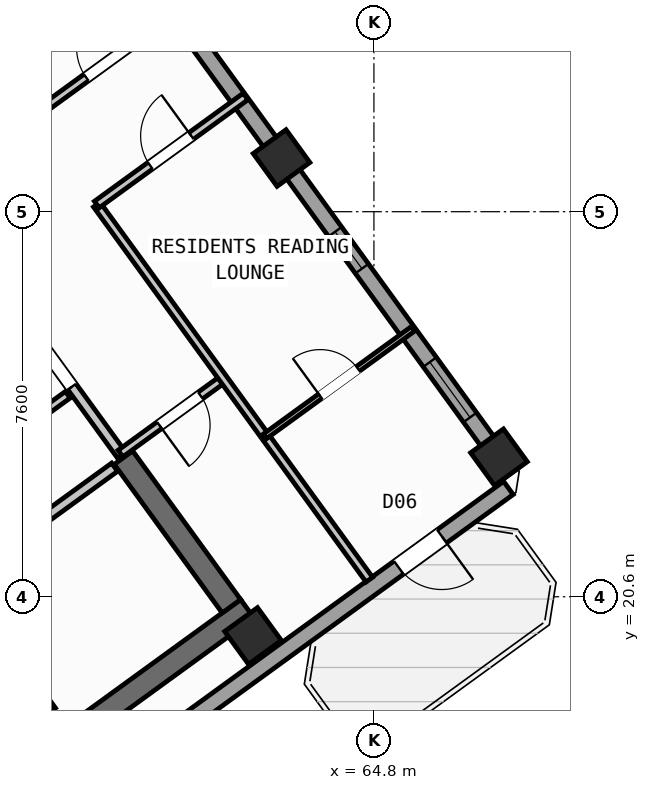
"""IFC4 building model, lengths in metres.
Left out: names, types, materials, properties, quantities, classifications, styles, units other than length and angle.
Written with IfcOpenShell. Run it as: python <this file> out.ifc"""

import sys

from ifc_helpers import new_model, si_unit, direction, frame, frame_2d, origin, origin_2d, place, context, subcontext, project, spatial, rectangle, hollow_rectangle, extrude, source, transform, mapped, element, fill, save


model = new_model("IFC4")
c1 = context("Model", 3, precision=1e-05, world=origin(), true_north=direction((0.0, 1.0)))
c2 = subcontext(c1, "Body", "Model", "MODEL_VIEW")
j1 = project(units=[si_unit("LENGTHUNIT", "METRE"), si_unit("PLANEANGLEUNIT", "RADIAN")], contexts=[c1])
p1 = place(None, origin())
s1 = spatial("IfcSite", under=j1, at=p1, CompositionType="ELEMENT")
p2 = place(p1, origin())
s2 = spatial("IfcBuilding", under=s1, at=p2, CompositionType="ELEMENT")
p3 = place(p2, frame((0.0, 0.0, 211.2)))
s3 = spatial("IfcBuildingStorey", under=s2, at=p3, CompositionType="ELEMENT", Elevation=211.2)
p4 = place(p3, frame((52.399, 13.169, 0.0), z_axis=(0.0, 0.0, 1.0), x_axis=(0.809022352778, 0.587777877013, 0.0)))
e1 = element("IfcWall", 1, at=p4, inside=s3, PredefinedType="SHEAR", context=c2, shape_type="SweptSolid", body=[
    extrude(rectangle(XDim=12.24, YDim=0.45, at=frame_2d((6.12, 0.0))), origin(), (0.0, 0.0, 1.0), 3.35),
])
p5 = place(p3, frame((61.988, 20.413, 0.0), z_axis=(0.0, 0.0, 1.0), x_axis=(-0.587819244441, 0.808992296542, 0.0)))
e2 = element("IfcWall", 2, at=p5, inside=s3, PredefinedType="SHEAR", context=c2, shape_type="SweptSolid", body=[
    extrude(rectangle(XDim=3.625, YDim=0.45, at=frame_2d((1.812, 0.0))), origin(), (0.0, 0.0, 1.0), 3.35),
])
m1 = source(origin(), c2, "Body", "SweptSolid", [
    extrude(hollow_rectangle(XDim=0.8, YDim=0.8, WallThickness=0.032, at=origin_2d()), origin(), (0.0, 0.0, 1.0), 3.6),
])
for number, where, z_axis, x_axis in (
    (3, (62.414, 19.827, 0.0), (0.0, 0.0, 1.0), (0.809, 0.588, 0.0)),
    (4, (67.268, 23.354, 0.0), (0.0, 0.0, 1.0), (0.809, 0.588, 0.0)),
    (5, (62.977, 29.259, 0.0), (0.0, 0.0, 1.0), (0.809, 0.588, 0.0)),
):
    element("IfcColumn", number, at=place(p3, frame(where, z_axis=z_axis, x_axis=x_axis)), inside=s3, PredefinedType="COLUMN", context=c2, shape_type="MappedRepresentation", body=[
        mapped(m1, transform((0.0, 0.0, 0.0), scale=1.0)),
    ])
p6 = place(p3, frame((54.81, 40.5, 0.0), z_axis=(0.0, 0.0, 1.0), x_axis=(0.587783625747, -0.809018176127, 0.0)))
e6 = element("IfcWall", 6, at=p6, inside=s3, PredefinedType="STANDARD", context=c2, shape_type="SweptSolid", body=[
    extrude(rectangle(XDim=21.587, YDim=0.32, at=frame_2d((10.794, 0.0))), origin(), (0.0, 0.0, 1.0), 2.825),
])
p7 = place(p6, frame((1.403, 0.0, 0.9)))
e7 = element("IfcOpeningElement", 7, at=p7, cuts=e6, PredefinedType="OPENING", context=c2, shape_type="SweptSolid", body=[
    extrude(rectangle(XDim=1.65, YDim=1.45, at=frame_2d((0.825, 0.725))), frame((0.0, 0.17, 0.0), z_axis=(0.0, -1.0, 0.0), x_axis=(1.0, 0.0, 0.0)), (0.0, 0.0, 1.0), 0.34),
])
p8 = place(p6, frame((4.695, 0.0, 1.0)))
e8 = element("IfcOpeningElement", 8, at=p8, cuts=e6, PredefinedType="OPENING", context=c2, shape_type="SweptSolid", body=[
    extrude(rectangle(XDim=0.9, YDim=1.25, at=frame_2d((0.45, 0.625))), frame((0.0, 0.17, 0.0), z_axis=(0.0, -1.0, 0.0), x_axis=(1.0, 0.0, 0.0)), (0.0, 0.0, 1.0), 0.34),
])
p9 = place(p6, frame((7.604, 0.0, 0.95)))
e9 = element("IfcOpeningElement", 9, at=p9, cuts=e6, PredefinedType="OPENING", context=c2, shape_type="SweptSolid", body=[
    extrude(rectangle(XDim=1.95, YDim=1.35, at=frame_2d((0.975, 0.675))), frame((0.0, 0.17, 0.0), z_axis=(0.0, -1.0, 0.0), x_axis=(1.0, 0.0, 0.0)), (0.0, 0.0, 1.0), 0.34),
])
p10 = place(p6, frame((15.692, 0.0, 1.0)))
e10 = element("IfcOpeningElement", 10, at=p10, cuts=e6, PredefinedType="OPENING", context=c2, shape_type="SweptSolid", body=[
    extrude(rectangle(XDim=0.9, YDim=1.25, at=frame_2d((0.45, 0.625))), frame((0.0, 0.17, 0.0), z_axis=(0.0, -1.0, 0.0), x_axis=(1.0, 0.0, 0.0)), (0.0, 0.0, 1.0), 0.34),
])
p11 = place(p6, frame((18.872, 0.0, 0.9)))
e11 = element("IfcOpeningElement", 11, at=p11, cuts=e6, PredefinedType="OPENING", context=c2, shape_type="SweptSolid", body=[
    extrude(rectangle(XDim=1.35, YDim=1.45, at=frame_2d((0.675, 0.725))), frame((0.0, 0.17, 0.0), z_axis=(0.0, -1.0, 0.0), x_axis=(1.0, 0.0, 0.0)), (0.0, 0.0, 1.0), 0.34),
])
p12 = place(p3, frame((67.454, 22.747, 0.0), z_axis=(0.0, 0.0, 1.0), x_axis=(-0.809021120468, -0.587779573171, 0.0)))
e12 = element("IfcWall", 12, at=p12, inside=s3, PredefinedType="STANDARD", context=c2, shape_type="SweptSolid", body=[
    extrude(rectangle(XDim=17.588, YDim=0.32, at=frame_2d((8.794, 0.0))), origin(), (0.0, 0.0, 1.0), 3.35),
])
p13 = place(p12, frame((1.624, 0.0, 0.0)))
e13 = element("IfcOpeningElement", 13, at=p13, cuts=e12, PredefinedType="OPENING", context=c2, shape_type="SweptSolid", body=[
    extrude(rectangle(XDim=1.05, YDim=2.15, at=frame_2d((0.525, 1.075))), frame((0.0, 0.17, 0.0), z_axis=(0.0, -1.0, 0.0), x_axis=(1.0, 0.0, 0.0)), (0.0, 0.0, 1.0), 0.34),
])
p14 = place(p12, frame((8.344, 0.0, 0.9)))
e14 = element("IfcOpeningElement", 14, at=p14, cuts=e12, PredefinedType="OPENING", context=c2, shape_type="SweptSolid", body=[
    extrude(rectangle(XDim=1.65, YDim=1.45, at=frame_2d((0.825, 0.725))), frame((0.0, 0.17, 0.0), z_axis=(0.0, -1.0, 0.0), x_axis=(1.0, 0.0, 0.0)), (0.0, 0.0, 1.0), 0.34),
])
p15 = place(p12, frame((13.594, 0.0, 0.9)))
e15 = element("IfcOpeningElement", 15, at=p15, cuts=e12, PredefinedType="OPENING", context=c2, shape_type="SweptSolid", body=[
    extrude(rectangle(XDim=1.65, YDim=1.45, at=frame_2d((0.825, 0.725))), frame((0.0, 0.17, 0.0), z_axis=(0.0, -1.0, 0.0), x_axis=(1.0, 0.0, 0.0)), (0.0, 0.0, 1.0), 0.34),
])
p16 = place(p3, frame((52.472, 14.013, 0.0), z_axis=(0.0, 0.0, 1.0), x_axis=(0.809028366311, 0.587769599847, 0.0)))
e16 = element("IfcWall", 16, at=p16, inside=s3, PredefinedType="SHEAR", context=c2, shape_type="SweptSolid", body=[
    extrude(rectangle(XDim=7.33, YDim=0.26, at=frame_2d((3.665, 0.0))), origin(), (0.0, 0.0, 1.0), 3.35),
])
p17 = place(p3, frame((58.41, 18.327, 0.0), z_axis=(0.0, 0.0, 1.0), x_axis=(-0.58776738483, 0.809029975545, 0.0)))
e17 = element("IfcWall", 17, at=p17, inside=s3, PredefinedType="SHEAR", context=c2, shape_type="SweptSolid", body=[
    extrude(rectangle(XDim=3.16, YDim=0.26, at=frame_2d((1.58, 0.0))), origin(), (0.0, 0.0, 1.0), 3.35),
])
p18 = place(p3, frame((56.553, 20.884, 0.0), z_axis=(0.0, 0.0, 1.0), x_axis=(0.809041669066, 0.587751288995, 0.0)))
e18 = element("IfcWall", 18, at=p18, inside=s3, PredefinedType="STANDARD", context=c2, shape_type="SweptSolid", body=[
    extrude(rectangle(XDim=3.868, YDim=0.2, at=frame_2d((1.934, 0.0))), origin(), (0.0, 0.0, 1.0), 3.34),
])
p19 = place(p18, frame((0.55, 0.0, 0.0)))
e19 = element("IfcOpeningElement", 19, at=p19, cuts=e18, PredefinedType="OPENING", context=c2, shape_type="SweptSolid", body=[
    extrude(rectangle(XDim=0.86, YDim=2.05, at=frame_2d((0.43, 1.025))), frame((0.0, 0.11, 0.0), z_axis=(0.0, -1.0, 0.0), x_axis=(1.0, 0.0, 0.0)), (0.0, 0.0, 1.0), 0.22),
])
p20 = place(p3, frame((54.421, 21.436, 0.0), z_axis=(0.0, 0.0, 1.0), x_axis=(0.809013710463, 0.587789772183, 0.0)))
e20 = element("IfcWall", 20, at=p20, inside=s3, PredefinedType="PARTITIONING", context=c2, shape_type="SweptSolid", body=[
    extrude(rectangle(XDim=5.36, YDim=0.16, at=frame_2d((2.68, 0.0))), origin(), (0.0, 0.0, 1.0), 3.34),
])
p21 = place(p20, frame((1.4, 0.0, 0.0)))
e21 = element("IfcOpeningElement", 21, at=p21, cuts=e20, PredefinedType="OPENING", context=c2, shape_type="SweptSolid", body=[
    extrude(rectangle(XDim=0.86, YDim=2.05, at=frame_2d((0.43, 1.025))), frame((0.0, 0.09, 0.0), z_axis=(0.0, -1.0, 0.0), x_axis=(1.0, 0.0, 0.0)), (0.0, 0.0, 1.0), 0.18),
])
p22 = place(p3, frame((59.827, 23.386, 0.0), z_axis=(0.0, 0.0, 1.0), x_axis=(-0.587803840107, 0.809003489211, 0.0)))
e22 = element("IfcWall", 22, at=p22, inside=s3, PredefinedType="STANDARD", context=c2, shape_type="SweptSolid", body=[
    extrude(rectangle(XDim=2.96, YDim=0.2, at=frame_2d((1.48, 0.0))), origin(), (0.0, 0.0, 1.0), 3.34),
])
p23 = place(p22, frame((1.68, 0.0, 0.0)))
e23 = element("IfcOpeningElement", 23, at=p23, cuts=e22, PredefinedType="OPENING", context=c2, shape_type="SweptSolid", body=[
    extrude(rectangle(XDim=1.0, YDim=2.1, at=frame_2d((0.5, 1.05))), frame((0.0, 0.11, 0.0), z_axis=(0.0, -1.0, 0.0), x_axis=(1.0, 0.0, 0.0)), (0.0, 0.0, 1.0), 0.22),
])
p24 = place(p3, frame((59.798, 23.427, 0.0), z_axis=(0.0, 0.0, 1.0), x_axis=(0.809034604122, 0.587761013791, 0.0)))
e24 = element("IfcWall", 24, at=p24, inside=s3, PredefinedType="PARTITIONING", context=c2, shape_type="SweptSolid", body=[
    extrude(rectangle(XDim=2.51, YDim=0.16, at=frame_2d((1.255, 0.0))), origin(), (0.0, 0.0, 1.0), 3.34),
])
p25 = place(p24, frame((0.95, 0.0, 0.0)))
e25 = element("IfcOpeningElement", 25, at=p25, cuts=e24, PredefinedType="OPENING", context=c2, shape_type="SweptSolid", body=[
    extrude(rectangle(XDim=1.0, YDim=2.1, at=frame_2d((0.5, 1.05))), frame((0.0, 0.09, 0.0), z_axis=(0.0, -1.0, 0.0), x_axis=(1.0, 0.0, 0.0)), (0.0, 0.0, 1.0), 0.18),
])
p26 = place(p3, frame((64.709, 20.938, 0.0), z_axis=(0.0, 0.0, 1.0), x_axis=(-0.587776590479, 0.80902328748, 0.0)))
e26 = element("IfcWall", 26, at=p26, inside=s3, PredefinedType="PARTITIONING", context=c2, shape_type="SweptSolid", body=[
    extrude(rectangle(XDim=9.15, YDim=0.16, at=frame_2d((4.575, 0.0))), origin(), (0.0, 0.0, 1.0), 3.34),
])
p27 = place(p3, frame((59.331, 28.341, 0.0), z_axis=(0.0, 0.0, 1.0), x_axis=(0.809003564202, 0.587803736896, 0.0)))
e27 = element("IfcWall", 27, at=p27, inside=s3, PredefinedType="PARTITIONING", context=c2, shape_type="SweptSolid", body=[
    extrude(rectangle(XDim=3.63, YDim=0.16, at=frame_2d((1.815, 0.0))), origin(), (0.0, 0.0, 1.0), 3.34),
])
p28 = place(p27, frame((1.305, 0.0, 0.0)))
e28 = element("IfcOpeningElement", 28, at=p28, cuts=e27, PredefinedType="OPENING", context=c2, shape_type="SweptSolid", body=[
    extrude(rectangle(XDim=1.0, YDim=2.1, at=frame_2d((0.5, 1.05))), frame((0.0, 0.09, 0.0), z_axis=(0.0, -1.0, 0.0), x_axis=(1.0, 0.0, 0.0)), (0.0, 0.0, 1.0), 0.18),
])
p29 = place(p3, frame((58.067, 30.08, 0.0), z_axis=(0.0, 0.0, 1.0), x_axis=(0.809012309495, 0.587791700422, 0.0)))
e29 = element("IfcWall", 29, at=p29, inside=s3, PredefinedType="PARTITIONING", context=c2, shape_type="SweptSolid", body=[
    extrude(rectangle(XDim=3.63, YDim=0.16, at=frame_2d((1.815, 0.0))), origin(), (0.0, 0.0, 1.0), 3.34),
])
p30 = place(p29, frame((1.305, 0.0, 0.0)))
e30 = element("IfcOpeningElement", 30, at=p30, cuts=e29, PredefinedType="OPENING", context=c2, shape_type="SweptSolid", body=[
    extrude(rectangle(XDim=1.0, YDim=2.1, at=frame_2d((0.5, 1.05))), frame((0.0, 0.09, 0.0), z_axis=(0.0, -1.0, 0.0), x_axis=(1.0, 0.0, 0.0)), (0.0, 0.0, 1.0), 0.18),
])
p31 = place(p3, frame((62.653, 23.768, 0.0), z_axis=(0.0, 0.0, 1.0), x_axis=(0.809037198293, 0.58775744298, 0.0)))
e31 = element("IfcWall", 31, at=p31, inside=s3, PredefinedType="PARTITIONING", context=c2, shape_type="SweptSolid", body=[
    extrude(rectangle(XDim=3.61, YDim=0.11, at=frame_2d((1.805, 0.0))), origin(), (0.0, 0.0, 1.0), 3.34),
])
p32 = place(p31, frame((1.345, 0.0, 0.0)))
e32 = element("IfcOpeningElement", 32, at=p32, cuts=e31, PredefinedType="OPENING", context=c2, shape_type="SweptSolid", body=[
    extrude(rectangle(XDim=0.92, YDim=2.08, at=frame_2d((0.46, 1.04))), frame((0.0, 0.065, 0.0), z_axis=(0.0, -1.0, 0.0), x_axis=(1.0, 0.0, 0.0)), (0.0, 0.0, 1.0), 0.13),
])
m2 = source(origin(), c2, "Body", "SweptSolid", [
    extrude(rectangle(XDim=1.05, YDim=2.15, at=frame_2d((0.525, 1.075))), frame((0.0, 0.025, 0.0), z_axis=(0.0, -1.0, 0.0), x_axis=(1.0, 0.0, 0.0)), (0.0, 0.0, 1.0), 0.05),
])
p33 = place(p13, origin())
e33 = element("IfcDoor", 33, at=p33, inside=s3, OperationType="SINGLE_SWING_LEFT", PredefinedType="DOOR", context=c2, shape_type="MappedRepresentation", body=[
    mapped(m2, transform((0.0, 0.0, 0.0), scale=1.0)),
])
fill(e13, e33)
m3 = source(origin(), c2, "Body", "SweptSolid", [
    extrude(rectangle(XDim=0.9, YDim=1.25, at=frame_2d((0.45, 0.625))), frame((0.0, 0.03, 0.0), z_axis=(0.0, -1.0, 0.0), x_axis=(1.0, 0.0, 0.0)), (0.0, 0.0, 1.0), 0.06),
])
p34 = place(p10, origin())
e34 = element("IfcWindow", 34, at=p34, inside=s3, PartitioningType="SINGLE_PANEL", PredefinedType="WINDOW", context=c2, shape_type="MappedRepresentation", body=[
    mapped(m3, transform((0.0, 0.0, 0.0), scale=1.0)),
])
fill(e10, e34)
m4 = source(origin(), c2, "Body", "SweptSolid", [
    extrude(rectangle(XDim=1.35, YDim=1.45, at=frame_2d((0.675, 0.725))), frame((0.0, 0.03, 0.0), z_axis=(0.0, -1.0, 0.0), x_axis=(1.0, 0.0, 0.0)), (0.0, 0.0, 1.0), 0.06),
])
p35 = place(p11, origin())
e35 = element("IfcWindow", 35, at=p35, inside=s3, PartitioningType="SINGLE_PANEL", PredefinedType="WINDOW", context=c2, shape_type="MappedRepresentation", body=[
    mapped(m4, transform((0.0, 0.0, 0.0), scale=1.0)),
])
fill(e11, e35)
m5 = source(origin(), c2, "Body", "SweptSolid", [
    extrude(rectangle(XDim=1.0, YDim=2.1, at=frame_2d((0.5, 1.05))), frame((0.0, 0.025, 0.0), z_axis=(0.0, -1.0, 0.0), x_axis=(1.0, 0.0, 0.0)), (0.0, 0.0, 1.0), 0.05),
])
p36 = place(p25, frame((1.0, 0.0, 0.0), z_axis=(0.0, 0.0, 1.0), x_axis=(-1.0, 0.0, 0.0)))
e36 = element("IfcDoor", 36, at=p36, inside=s3, OperationType="SINGLE_SWING_RIGHT", PredefinedType="DOOR", context=c2, shape_type="MappedRepresentation", body=[
    mapped(m5, transform((0.0, 0.0, 0.0), scale=1.0)),
])
fill(e25, e36)
p37 = place(p23, origin())
e37 = element("IfcDoor", 37, at=p37, inside=s3, OperationType="SINGLE_SWING_LEFT", PredefinedType="DOOR", context=c2, shape_type="MappedRepresentation", body=[
    mapped(m5, transform((0.0, 0.0, 0.0), scale=1.0)),
])
fill(e23, e37)
p38 = place(p30, origin())
e38 = element("IfcDoor", 38, at=p38, inside=s3, OperationType="SINGLE_SWING_RIGHT", PredefinedType="DOOR", context=c2, shape_type="MappedRepresentation", body=[
    mapped(m5, transform((0.0, 0.0, 0.0), scale=1.0)),
])
fill(e30, e38)
p39 = place(p28, origin())
e39 = element("IfcDoor", 39, at=p39, inside=s3, OperationType="SINGLE_SWING_RIGHT", PredefinedType="DOOR", context=c2, shape_type="MappedRepresentation", body=[
    mapped(m5, transform((0.0, 0.0, 0.0), scale=1.0)),
])
fill(e28, e39)
m6 = source(origin(), c2, "Body", "SweptSolid", [
    extrude(rectangle(XDim=0.92, YDim=2.08, at=frame_2d((0.46, 1.04))), frame((0.0, 0.025, 0.0), z_axis=(0.0, -1.0, 0.0), x_axis=(1.0, 0.0, 0.0)), (0.0, 0.0, 1.0), 0.05),
])
p40 = place(p32, origin())
e40 = element("IfcDoor", 40, at=p40, inside=s3, OperationType="SINGLE_SWING_LEFT", PredefinedType="DOOR", context=c2, shape_type="MappedRepresentation", body=[
    mapped(m6, transform((0.0, 0.0, 0.0), scale=1.0)),
])
fill(e32, e40)
save(model, sys.argv[1])
